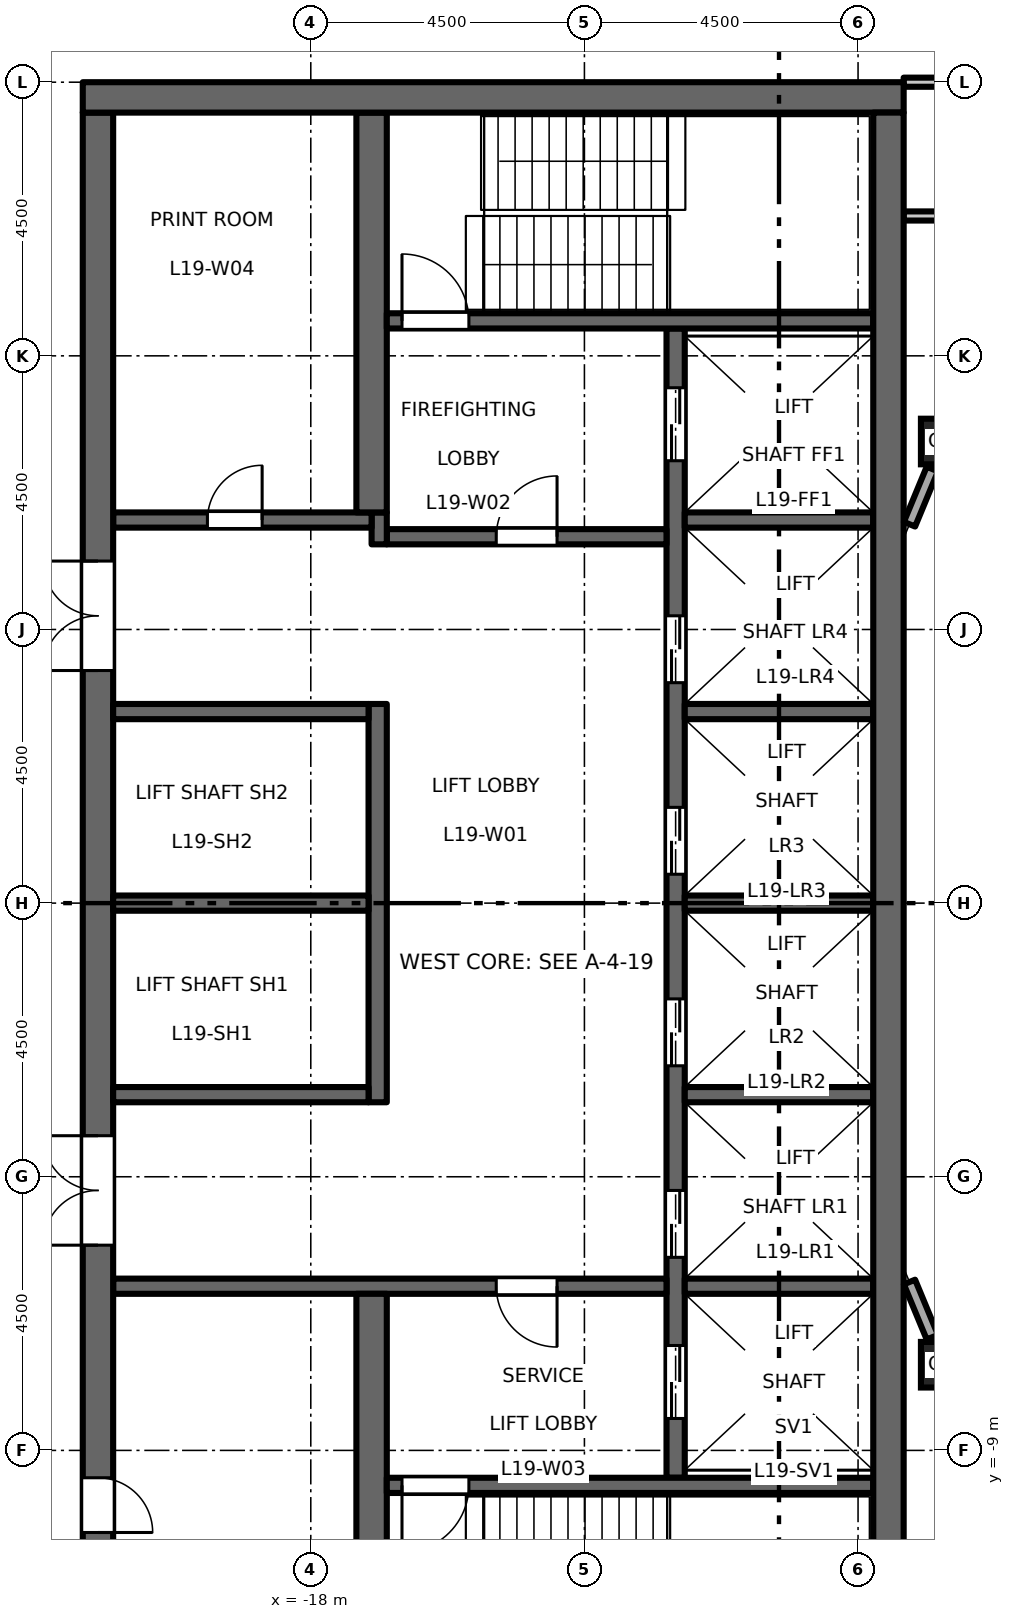
"""IFC4 building model, lengths in metres.
Left out: names, types, materials, properties, quantities, classifications, styles, units other than length and angle.
Written with IfcOpenShell. Run it as: python <this file> out.ifc"""

import sys

from ifc_helpers import new_model, si_unit, direction, frame, frame_2d, origin, origin_2d, place, context, subcontext, project, spatial, rectangle, hollow_rectangle, extrude, element, fill, save


model = new_model("IFC4")
c1 = context("Model", 3, precision=1e-05, world=origin(), true_north=direction((0.0, 1.0)))
c2 = subcontext(c1, "Body", "Model", "MODEL_VIEW")
j1 = project(units=[si_unit("LENGTHUNIT", "METRE"), si_unit("PLANEANGLEUNIT", "RADIAN")], contexts=[c1])
p1 = place(None, origin())
s1 = spatial("IfcSite", under=j1, at=p1, CompositionType="ELEMENT")
p2 = place(p1, origin())
s2 = spatial("IfcBuilding", under=s1, at=p2, CompositionType="ELEMENT")
p3 = place(p2, frame((0.0, 0.0, 89.7)))
s3 = spatial("IfcBuildingStorey", under=s2, at=p3, CompositionType="ELEMENT", Elevation=89.7)
for number, where, z_axis, x_axis in (
    (1, (-7.591, -7.591, 0.0), (0.0, 0.0, 1.0), (1.0, 0.0, 0.0)),
    (2, (-7.591, 7.591, 0.0), (0.0, 0.0, 1.0), (1.0, 0.0, 0.0)),
):
    element("IfcColumn", number, at=place(p3, frame(where, z_axis=z_axis, x_axis=x_axis)), inside=s3, PredefinedType="COLUMN", context=c2, shape_type="SweptSolid", body=[
        extrude(hollow_rectangle(XDim=0.75, YDim=0.75, WallThickness=0.045, at=origin_2d()), origin(), (0.0, 0.0, 1.0), 4.5),
    ])
p4 = place(p3, frame((-12.0, -9.45, 0.0), z_axis=(0.0, 0.0, 1.0), x_axis=(0.0, 1.0, 0.0)))
e3 = element("IfcWall", 3, at=p4, inside=s3, PredefinedType="SHEAR", context=c2, shape_type="SweptSolid", body=[
    extrude(rectangle(XDim=18.9, YDim=0.3, at=frame_2d((9.45, 0.0))), origin(), (0.0, 0.0, 1.0), 4.3),
])
p5 = place(p4, frame((3.625, 0.0, 0.0)))
e4 = element("IfcOpeningElement", 4, at=p5, cuts=e3, PredefinedType="OPENING", context=c2, shape_type="SweptSolid", body=[
    extrude(rectangle(XDim=1.1, YDim=2.1, at=frame_2d((0.55, 1.05))), frame((0.0, 0.16, 0.0), z_axis=(0.0, -1.0, 0.0), x_axis=(1.0, 0.0, 0.0)), (0.0, 0.0, 1.0), 0.32),
])
p6 = place(p4, frame((6.775, 0.0, 0.0)))
e5 = element("IfcOpeningElement", 5, at=p6, cuts=e3, PredefinedType="OPENING", context=c2, shape_type="SweptSolid", body=[
    extrude(rectangle(XDim=1.1, YDim=2.1, at=frame_2d((0.55, 1.05))), frame((0.0, 0.16, 0.0), z_axis=(0.0, -1.0, 0.0), x_axis=(1.0, 0.0, 0.0)), (0.0, 0.0, 1.0), 0.32),
])
p7 = place(p4, frame((9.925, 0.0, 0.0)))
e6 = element("IfcOpeningElement", 6, at=p7, cuts=e3, PredefinedType="OPENING", context=c2, shape_type="SweptSolid", body=[
    extrude(rectangle(XDim=1.1, YDim=2.1, at=frame_2d((0.55, 1.05))), frame((0.0, 0.16, 0.0), z_axis=(0.0, -1.0, 0.0), x_axis=(1.0, 0.0, 0.0)), (0.0, 0.0, 1.0), 0.32),
])
p8 = place(p4, frame((13.075, 0.0, 0.0)))
e7 = element("IfcOpeningElement", 7, at=p8, cuts=e3, PredefinedType="OPENING", context=c2, shape_type="SweptSolid", body=[
    extrude(rectangle(XDim=1.1, YDim=2.1, at=frame_2d((0.55, 1.05))), frame((0.0, 0.16, 0.0), z_axis=(0.0, -1.0, 0.0), x_axis=(1.0, 0.0, 0.0)), (0.0, 0.0, 1.0), 0.32),
])
p9 = place(p4, frame((16.725, 0.0, 0.0)))
e8 = element("IfcOpeningElement", 8, at=p9, cuts=e3, PredefinedType="OPENING", context=c2, shape_type="SweptSolid", body=[
    extrude(rectangle(XDim=1.2, YDim=2.1, at=frame_2d((0.6, 1.05))), frame((0.0, 0.16, 0.0), z_axis=(0.0, -1.0, 0.0), x_axis=(1.0, 0.0, 0.0)), (0.0, 0.0, 1.0), 0.32),
])
p10 = place(p4, frame((0.975, 0.0, 0.0)))
e9 = element("IfcOpeningElement", 9, at=p10, cuts=e3, PredefinedType="OPENING", context=c2, shape_type="SweptSolid", body=[
    extrude(rectangle(XDim=1.2, YDim=2.1, at=frame_2d((0.6, 1.05))), frame((0.0, 0.16, 0.0), z_axis=(0.0, -1.0, 0.0), x_axis=(1.0, 0.0, 0.0)), (0.0, 0.0, 1.0), 0.32),
])
p11 = place(p3, frame((-12.15, 6.025, 0.0), z_axis=(0.0, 0.0, 1.0), x_axis=(-1.0, 0.0, 0.0)))
e10 = element("IfcWall", 10, at=p11, inside=s3, PredefinedType="SHEAR", context=c2, shape_type="SweptSolid", body=[
    extrude(rectangle(XDim=4.6, YDim=0.25, at=frame_2d((2.3, 0.0))), origin(), (0.0, 0.0, 1.0), 4.3),
])
p12 = place(p11, frame((1.8, 0.0, 0.0)))
e11 = element("IfcOpeningElement", 11, at=p12, cuts=e10, PredefinedType="OPENING", context=c2, shape_type="SweptSolid", body=[
    extrude(rectangle(XDim=1.0, YDim=2.1, at=frame_2d((0.5, 1.05))), frame((0.0, 0.135, 0.0), z_axis=(0.0, -1.0, 0.0), x_axis=(1.0, 0.0, 0.0)), (0.0, 0.0, 1.0), 0.27),
])
p13 = place(p3, frame((-16.875, 5.9, 0.0), z_axis=(0.0, 0.0, 1.0), x_axis=(0.0, 1.0, 0.0)))
e12 = element("IfcWall", 12, at=p13, inside=s3, PredefinedType="SHEAR", context=c2, shape_type="SweptSolid", body=[
    extrude(rectangle(XDim=0.525, YDim=0.25, at=frame_2d((0.263, 0.0))), origin(), (0.0, 0.0, 1.0), 4.3),
])
p14 = place(p3, frame((-17.0, 6.3, 0.0), z_axis=(0.0, 0.0, 1.0), x_axis=(-1.0, 0.0, 0.0)))
e13 = element("IfcWall", 13, at=p14, inside=s3, PredefinedType="SHEAR", context=c2, shape_type="SweptSolid", body=[
    extrude(rectangle(XDim=4.25, YDim=0.25, at=frame_2d((2.125, 0.0))), origin(), (0.0, 0.0, 1.0), 4.3),
])
p15 = place(p14, frame((1.8, 0.0, 0.0)))
e14 = element("IfcOpeningElement", 14, at=p15, cuts=e13, PredefinedType="OPENING", context=c2, shape_type="SweptSolid", body=[
    extrude(rectangle(XDim=0.9, YDim=2.1, at=frame_2d((0.45, 1.05))), frame((0.0, 0.135, 0.0), z_axis=(0.0, -1.0, 0.0), x_axis=(1.0, 0.0, 0.0)), (0.0, 0.0, 1.0), 0.27),
])
p16 = place(p3, frame((-12.15, -6.3, 0.0), z_axis=(0.0, 0.0, 1.0), x_axis=(-1.0, 0.0, 0.0)))
e15 = element("IfcWall", 15, at=p16, inside=s3, PredefinedType="SHEAR", context=c2, shape_type="SweptSolid", body=[
    extrude(rectangle(XDim=9.1, YDim=0.25, at=frame_2d((4.55, 0.0))), origin(), (0.0, 0.0, 1.0), 4.3),
])
p17 = place(p16, frame((1.8, 0.0, 0.0)))
e16 = element("IfcOpeningElement", 16, at=p17, cuts=e15, PredefinedType="OPENING", context=c2, shape_type="SweptSolid", body=[
    extrude(rectangle(XDim=1.0, YDim=2.1, at=frame_2d((0.5, 1.05))), frame((0.0, 0.135, 0.0), z_axis=(0.0, -1.0, 0.0), x_axis=(1.0, 0.0, 0.0)), (0.0, 0.0, 1.0), 0.27),
])
p18 = place(p3, frame((-21.5, -13.0, 0.0), z_axis=(0.0, 0.0, 1.0), x_axis=(0.0, 1.0, 0.0)))
e17 = element("IfcWall", 17, at=p18, inside=s3, PredefinedType="SHEAR", context=c2, shape_type="SweptSolid", body=[
    extrude(rectangle(XDim=26.0, YDim=0.5, at=frame_2d((13.0, 0.0))), origin(), (0.0, 0.0, 1.0), 4.3),
])
p19 = place(p18, frame((16.825, 0.0, 0.0)))
e18 = element("IfcOpeningElement", 18, at=p19, cuts=e17, PredefinedType="OPENING", context=c2, shape_type="SweptSolid", body=[
    extrude(rectangle(XDim=1.8, YDim=2.1, at=frame_2d((0.9, 1.05))), frame((0.0, 0.26, 0.0), z_axis=(0.0, -1.0, 0.0), x_axis=(1.0, 0.0, 0.0)), (0.0, 0.0, 1.0), 0.52),
])
p20 = place(p18, frame((7.375, 0.0, 0.0)))
e19 = element("IfcOpeningElement", 19, at=p20, cuts=e17, PredefinedType="OPENING", context=c2, shape_type="SweptSolid", body=[
    extrude(rectangle(XDim=1.8, YDim=2.1, at=frame_2d((0.9, 1.05))), frame((0.0, 0.26, 0.0), z_axis=(0.0, -1.0, 0.0), x_axis=(1.0, 0.0, 0.0)), (0.0, 0.0, 1.0), 0.52),
])
p21 = place(p18, frame((2.65, 0.0, 0.0)))
e20 = element("IfcOpeningElement", 20, at=p21, cuts=e17, PredefinedType="OPENING", context=c2, shape_type="SweptSolid", body=[
    extrude(rectangle(XDim=0.9, YDim=2.1, at=frame_2d((0.45, 1.05))), frame((0.0, 0.26, 0.0), z_axis=(0.0, -1.0, 0.0), x_axis=(1.0, 0.0, 0.0)), (0.0, 0.0, 1.0), 0.52),
])
p22 = place(p3, frame((-16.9, -3.275, 0.0), z_axis=(0.0, 0.0, 1.0), x_axis=(0.0, 1.0, 0.0)))
e21 = element("IfcWall", 21, at=p22, inside=s3, PredefinedType="SHEAR", context=c2, shape_type="SweptSolid", body=[
    extrude(rectangle(XDim=6.55, YDim=0.3, at=frame_2d((3.275, 0.0))), origin(), (0.0, 0.0, 1.0), 4.3),
])
for number, where, z_axis, x_axis in (
    (22, (-17.05, 0.0, 0.0), (0.0, 0.0, 1.0), (-1.0, 0.0, 0.0)),
    (23, (-17.05, 3.15, 0.0), (0.0, 0.0, 1.0), (-1.0, 0.0, 0.0)),
    (24, (-17.05, -3.15, 0.0), (0.0, 0.0, 1.0), (-1.0, 0.0, 0.0)),
):
    element("IfcWall", number, at=place(p3, frame(where, z_axis=z_axis, x_axis=x_axis)), inside=s3, PredefinedType="SHEAR", context=c2, shape_type="SweptSolid", body=[
        extrude(rectangle(XDim=4.2, YDim=0.25, at=frame_2d((2.1, 0.0))), origin(), (0.0, 0.0, 1.0), 4.3),
    ])
for number, where, z_axis, x_axis in (
    (25, (-17.0, 6.425, 0.0), (0.0, 0.0, 1.0), (0.0, 1.0, 0.0)),
    (26, (-17.0, -13.0, 0.0), (0.0, 0.0, 1.0), (0.0, 1.0, 0.0)),
):
    element("IfcWall", number, at=place(p3, frame(where, z_axis=z_axis, x_axis=x_axis)), inside=s3, PredefinedType="SHEAR", context=c2, shape_type="SweptSolid", body=[
        extrude(rectangle(XDim=6.575, YDim=0.5, at=frame_2d((3.288, 0.0))), origin(), (0.0, 0.0, 1.0), 4.3),
    ])
for number, where, z_axis, x_axis in (
    (27, (-8.75, 0.0, 0.0), (0.0, 0.0, 1.0), (-1.0, 0.0, 0.0)),
    (28, (-8.75, 3.15, 0.0), (0.0, 0.0, 1.0), (-1.0, 0.0, 0.0)),
    (29, (-8.75, 6.3, 0.0), (0.0, 0.0, 1.0), (-1.0, 0.0, 0.0)),
    (30, (-8.75, -3.15, 0.0), (0.0, 0.0, 1.0), (-1.0, 0.0, 0.0)),
    (31, (-8.75, -6.3, 0.0), (0.0, 0.0, 1.0), (-1.0, 0.0, 0.0)),
):
    element("IfcWall", number, at=place(p3, frame(where, z_axis=z_axis, x_axis=x_axis)), inside=s3, PredefinedType="SHEAR", context=c2, shape_type="SweptSolid", body=[
        extrude(rectangle(XDim=3.1, YDim=0.25, at=frame_2d((1.55, 0.0))), origin(), (0.0, 0.0, 1.0), 4.3),
    ])
p23 = place(p3, frame((-8.75, 9.575, 0.0), z_axis=(0.0, 0.0, 1.0), x_axis=(-1.0, 0.0, 0.0)))
e32 = element("IfcWall", 32, at=p23, inside=s3, PredefinedType="SHEAR", context=c2, shape_type="SweptSolid", body=[
    extrude(rectangle(XDim=8.0, YDim=0.25, at=frame_2d((4.0, 0.0))), origin(), (0.0, 0.0, 1.0), 4.3),
])
p24 = place(p23, frame((6.65, 0.0, 0.0)))
e33 = element("IfcOpeningElement", 33, at=p24, cuts=e32, PredefinedType="OPENING", context=c2, shape_type="SweptSolid", body=[
    extrude(rectangle(XDim=1.1, YDim=2.1, at=frame_2d((0.55, 1.05))), frame((0.0, 0.135, 0.0), z_axis=(0.0, -1.0, 0.0), x_axis=(1.0, 0.0, 0.0)), (0.0, 0.0, 1.0), 0.27),
])
p25 = place(p3, frame((-8.75, -9.575, 0.0), z_axis=(0.0, 0.0, 1.0), x_axis=(-1.0, 0.0, 0.0)))
e34 = element("IfcWall", 34, at=p25, inside=s3, PredefinedType="SHEAR", context=c2, shape_type="SweptSolid", body=[
    extrude(rectangle(XDim=8.0, YDim=0.25, at=frame_2d((4.0, 0.0))), origin(), (0.0, 0.0, 1.0), 4.3),
])
p26 = place(p25, frame((6.65, 0.0, 0.0)))
e35 = element("IfcOpeningElement", 35, at=p26, cuts=e34, PredefinedType="OPENING", context=c2, shape_type="SweptSolid", body=[
    extrude(rectangle(XDim=1.1, YDim=2.1, at=frame_2d((0.55, 1.05))), frame((0.0, 0.135, 0.0), z_axis=(0.0, -1.0, 0.0), x_axis=(1.0, 0.0, 0.0)), (0.0, 0.0, 1.0), 0.27),
])
p27 = place(p3, frame((-8.25, 13.25, 0.0), z_axis=(0.0, 0.0, 1.0), x_axis=(-1.0, 0.0, 0.0)))
e36 = element("IfcWall", 36, at=p27, inside=s3, PredefinedType="SHEAR", context=c2, shape_type="SweptSolid", body=[
    extrude(rectangle(XDim=13.5, YDim=0.5, at=frame_2d((6.75, 0.0))), origin(), (0.0, 0.0, 1.0), 4.3),
])
p28 = place(p3, frame((-8.5, -13.0, 0.0), z_axis=(0.0, 0.0, 1.0), x_axis=(0.0, 1.0, 0.0)))
e37 = element("IfcWall", 37, at=p28, inside=s3, PredefinedType="SHEAR", context=c2, shape_type="SweptSolid", body=[
    extrude(rectangle(XDim=26.0, YDim=0.5, at=frame_2d((13.0, 0.0))), origin(), (0.0, 0.0, 1.0), 4.3),
])
for number, where, z_axis, x_axis in (
    (38, (-7.779, 7.138, 0.0), (0.0, 0.0, 1.0), (-0.383, -0.924, 0.0)),
    (39, (-8.154, -6.231, 0.0), (0.0, 0.0, 1.0), (0.383, -0.924, 0.0)),
):
    element("IfcWall", number, at=place(p3, frame(where, z_axis=z_axis, x_axis=x_axis)), inside=s3, PredefinedType="STANDARD", context=c2, shape_type="SweptSolid", body=[
        extrude(rectangle(XDim=0.982, YDim=0.2, at=frame_2d((0.491, 0.0))), origin(), (0.0, 0.0, 1.0), 3.68),
    ])
p29 = place(p3, frame((-8.25, 11.3, 0.0), z_axis=(0.0, 0.0, 1.0), x_axis=(1.0, 0.0, 0.0)))
e40 = element("IfcWall", 40, at=p29, inside=s3, PredefinedType="PARTITIONING", context=c2, shape_type="SweptSolid", body=[
    extrude(rectangle(XDim=15.17, YDim=0.15, at=frame_2d((7.585, 0.0))), origin(), (0.0, 0.0, 1.0), 4.3),
])
p30 = place(p29, frame((4.65, 0.0, 0.0)))
e41 = element("IfcOpeningElement", 41, at=p30, cuts=e40, PredefinedType="OPENING", context=c2, shape_type="SweptSolid", body=[
    extrude(rectangle(XDim=1.0, YDim=2.1, at=frame_2d((0.5, 1.05))), frame((0.0, 0.085, 0.0), z_axis=(0.0, -1.0, 0.0), x_axis=(1.0, 0.0, 0.0)), (0.0, 0.0, 1.0), 0.17),
])
p31 = place(p29, frame((6.9, 0.0, 0.0)))
e42 = element("IfcOpeningElement", 42, at=p31, cuts=e40, PredefinedType="OPENING", context=c2, shape_type="SweptSolid", body=[
    extrude(rectangle(XDim=1.0, YDim=2.1, at=frame_2d((0.5, 1.05))), frame((0.0, 0.085, 0.0), z_axis=(0.0, -1.0, 0.0), x_axis=(1.0, 0.0, 0.0)), (0.0, 0.0, 1.0), 0.17),
])
p32 = place(p29, frame((13.65, 0.0, 0.0)))
e43 = element("IfcOpeningElement", 43, at=p32, cuts=e40, PredefinedType="OPENING", context=c2, shape_type="SweptSolid", body=[
    extrude(rectangle(XDim=1.0, YDim=2.1, at=frame_2d((0.5, 1.05))), frame((0.0, 0.085, 0.0), z_axis=(0.0, -1.0, 0.0), x_axis=(1.0, 0.0, 0.0)), (0.0, 0.0, 1.0), 0.17),
])
p33 = place(p3, frame((-8.25, 13.5, 0.0), z_axis=(0.0, 0.0, 1.0), x_axis=(1.0, 0.0, 0.0)))
e44 = element("IfcWall", 44, at=p33, inside=s3, PredefinedType="PARTITIONING", context=c2, shape_type="SweptSolid", body=[
    extrude(rectangle(XDim=16.5, YDim=0.15, at=frame_2d((8.25, 0.0))), origin(), (0.0, 0.0, 1.0), 3.8),
])
p34 = place(p33, frame((0.65, 0.0, 0.0)))
e45 = element("IfcOpeningElement", 45, at=p34, cuts=e44, PredefinedType="OPENING", context=c2, shape_type="SweptSolid", body=[
    extrude(rectangle(XDim=1.0, YDim=2.1, at=frame_2d((0.5, 1.05))), frame((0.0, 0.085, 0.0), z_axis=(0.0, -1.0, 0.0), x_axis=(1.0, 0.0, 0.0)), (0.0, 0.0, 1.0), 0.17),
])
p35 = place(p12, origin())
e46 = element("IfcDoor", 46, at=p35, inside=s3, OperationType="SINGLE_SWING_LEFT", PredefinedType="DOOR", context=c2, shape_type="SweptSolid", body=[
    extrude(rectangle(XDim=1.0, YDim=2.1, at=frame_2d((0.5, 1.05))), frame((0.0, 0.025, 0.0), z_axis=(0.0, -1.0, 0.0), x_axis=(1.0, 0.0, 0.0)), (0.0, 0.0, 1.0), 0.05),
])
fill(e11, e46)
p36 = place(p17, origin())
e47 = element("IfcDoor", 47, at=p36, inside=s3, OperationType="SINGLE_SWING_RIGHT", PredefinedType="DOOR", context=c2, shape_type="SweptSolid", body=[
    extrude(rectangle(XDim=1.0, YDim=2.1, at=frame_2d((0.5, 1.05))), frame((0.0, 0.025, 0.0), z_axis=(0.0, -1.0, 0.0), x_axis=(1.0, 0.0, 0.0)), (0.0, 0.0, 1.0), 0.05),
])
fill(e16, e47)
p37 = place(p24, origin())
e48 = element("IfcDoor", 48, at=p37, inside=s3, OperationType="SINGLE_SWING_RIGHT", PredefinedType="DOOR", context=c2, shape_type="SweptSolid", body=[
    extrude(rectangle(XDim=1.1, YDim=2.1, at=frame_2d((0.55, 1.05))), frame((0.0, 0.025, 0.0), z_axis=(0.0, -1.0, 0.0), x_axis=(1.0, 0.0, 0.0)), (0.0, 0.0, 1.0), 0.05),
])
fill(e33, e48)
p38 = place(p26, origin())
e49 = element("IfcDoor", 49, at=p38, inside=s3, OperationType="SINGLE_SWING_LEFT", PredefinedType="DOOR", context=c2, shape_type="SweptSolid", body=[
    extrude(rectangle(XDim=1.1, YDim=2.1, at=frame_2d((0.55, 1.05))), frame((0.0, 0.025, 0.0), z_axis=(0.0, -1.0, 0.0), x_axis=(1.0, 0.0, 0.0)), (0.0, 0.0, 1.0), 0.05),
])
fill(e35, e49)
p39 = place(p19, origin())
e50 = element("IfcDoor", 50, at=p39, inside=s3, OperationType="DOUBLE_DOOR_DOUBLE_SWING", PredefinedType="DOOR", context=c2, shape_type="SweptSolid", body=[
    extrude(rectangle(XDim=1.8, YDim=2.1, at=frame_2d((0.9, 1.05))), frame((0.0, 0.025, 0.0), z_axis=(0.0, -1.0, 0.0), x_axis=(1.0, 0.0, 0.0)), (0.0, 0.0, 1.0), 0.05),
])
fill(e18, e50)
p40 = place(p20, origin())
e51 = element("IfcDoor", 51, at=p40, inside=s3, OperationType="DOUBLE_DOOR_DOUBLE_SWING", PredefinedType="DOOR", context=c2, shape_type="SweptSolid", body=[
    extrude(rectangle(XDim=1.8, YDim=2.1, at=frame_2d((0.9, 1.05))), frame((0.0, 0.025, 0.0), z_axis=(0.0, -1.0, 0.0), x_axis=(1.0, 0.0, 0.0)), (0.0, 0.0, 1.0), 0.05),
])
fill(e19, e51)
p41 = place(p5, origin())
e52 = element("IfcDoor", 52, at=p41, inside=s3, OperationType="DOUBLE_DOOR_SLIDING", PredefinedType="DOOR", context=c2, shape_type="SweptSolid", body=[
    extrude(rectangle(XDim=1.1, YDim=2.1, at=frame_2d((0.55, 1.05))), frame((0.0, 0.025, 0.0), z_axis=(0.0, -1.0, 0.0), x_axis=(1.0, 0.0, 0.0)), (0.0, 0.0, 1.0), 0.05),
])
fill(e4, e52)
p42 = place(p6, origin())
e53 = element("IfcDoor", 53, at=p42, inside=s3, OperationType="DOUBLE_DOOR_SLIDING", PredefinedType="DOOR", context=c2, shape_type="SweptSolid", body=[
    extrude(rectangle(XDim=1.1, YDim=2.1, at=frame_2d((0.55, 1.05))), frame((0.0, 0.025, 0.0), z_axis=(0.0, -1.0, 0.0), x_axis=(1.0, 0.0, 0.0)), (0.0, 0.0, 1.0), 0.05),
])
fill(e5, e53)
p43 = place(p7, origin())
e54 = element("IfcDoor", 54, at=p43, inside=s3, OperationType="DOUBLE_DOOR_SLIDING", PredefinedType="DOOR", context=c2, shape_type="SweptSolid", body=[
    extrude(rectangle(XDim=1.1, YDim=2.1, at=frame_2d((0.55, 1.05))), frame((0.0, 0.025, 0.0), z_axis=(0.0, -1.0, 0.0), x_axis=(1.0, 0.0, 0.0)), (0.0, 0.0, 1.0), 0.05),
])
fill(e6, e54)
p44 = place(p8, origin())
e55 = element("IfcDoor", 55, at=p44, inside=s3, OperationType="DOUBLE_DOOR_SLIDING", PredefinedType="DOOR", context=c2, shape_type="SweptSolid", body=[
    extrude(rectangle(XDim=1.1, YDim=2.1, at=frame_2d((0.55, 1.05))), frame((0.0, 0.025, 0.0), z_axis=(0.0, -1.0, 0.0), x_axis=(1.0, 0.0, 0.0)), (0.0, 0.0, 1.0), 0.05),
])
fill(e7, e55)
p45 = place(p9, origin())
e56 = element("IfcDoor", 56, at=p45, inside=s3, OperationType="DOUBLE_DOOR_SLIDING", PredefinedType="DOOR", context=c2, shape_type="SweptSolid", body=[
    extrude(rectangle(XDim=1.2, YDim=2.1, at=frame_2d((0.6, 1.05))), frame((0.0, 0.025, 0.0), z_axis=(0.0, -1.0, 0.0), x_axis=(1.0, 0.0, 0.0)), (0.0, 0.0, 1.0), 0.05),
])
fill(e8, e56)
p46 = place(p10, origin())
e57 = element("IfcDoor", 57, at=p46, inside=s3, OperationType="DOUBLE_DOOR_SLIDING", PredefinedType="DOOR", context=c2, shape_type="SweptSolid", body=[
    extrude(rectangle(XDim=1.2, YDim=2.1, at=frame_2d((0.6, 1.05))), frame((0.0, 0.025, 0.0), z_axis=(0.0, -1.0, 0.0), x_axis=(1.0, 0.0, 0.0)), (0.0, 0.0, 1.0), 0.05),
])
fill(e9, e57)
p47 = place(p15, origin())
e58 = element("IfcDoor", 58, at=p47, inside=s3, OperationType="SINGLE_SWING_LEFT", PredefinedType="DOOR", context=c2, shape_type="SweptSolid", body=[
    extrude(rectangle(XDim=0.9, YDim=2.1, at=frame_2d((0.45, 1.05))), frame((0.0, 0.025, 0.0), z_axis=(0.0, -1.0, 0.0), x_axis=(1.0, 0.0, 0.0)), (0.0, 0.0, 1.0), 0.05),
])
fill(e14, e58)
p48 = place(p21, origin())
e59 = element("IfcDoor", 59, at=p48, inside=s3, OperationType="SINGLE_SWING_LEFT", PredefinedType="DOOR", context=c2, shape_type="SweptSolid", body=[
    extrude(rectangle(XDim=0.9, YDim=2.1, at=frame_2d((0.45, 1.05))), frame((0.0, 0.025, 0.0), z_axis=(0.0, -1.0, 0.0), x_axis=(1.0, 0.0, 0.0)), (0.0, 0.0, 1.0), 0.05),
])
fill(e20, e59)
save(model, sys.argv[1])
